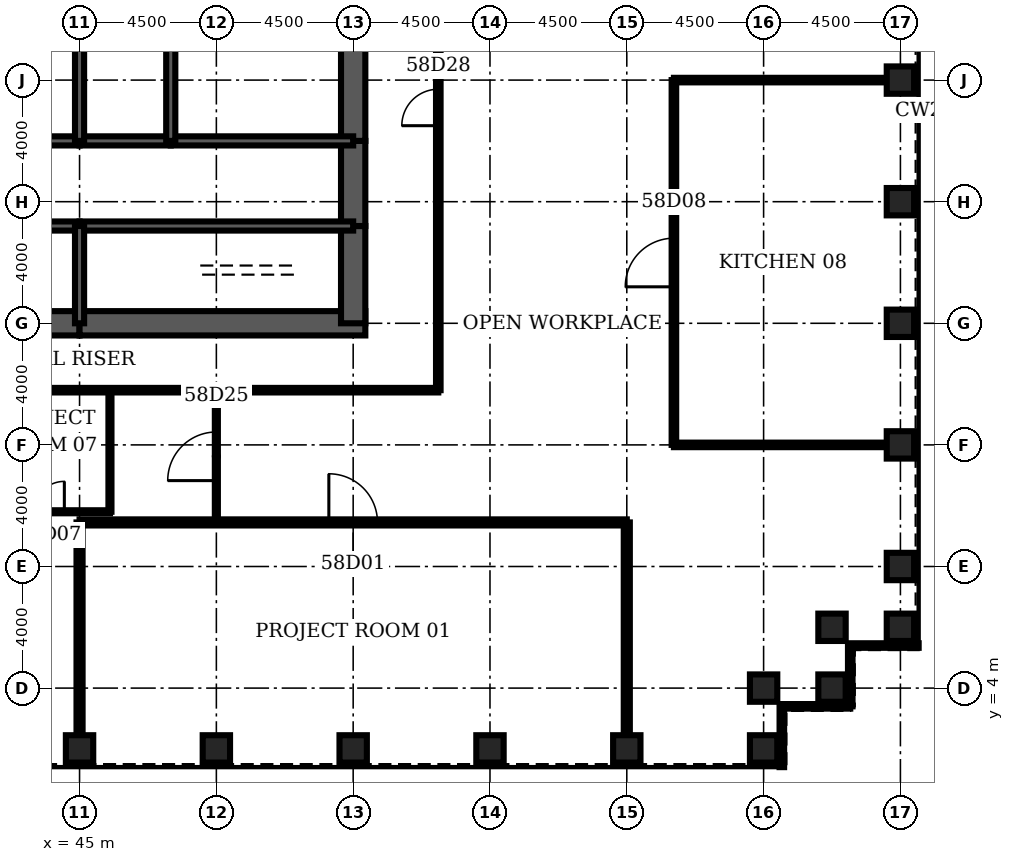
"""IFC4 building model, lengths in metres.
Left out: names, types, materials, properties, quantities, classifications, styles, units other than length and angle.
Written with IfcOpenShell. Run it as: python <this file> out.ifc"""

import sys

from ifc_helpers import new_model, si_unit, direction, frame, frame_2d, origin, origin_2d, place, context, subcontext, project, spatial, rectangle, hollow_rectangle, extrude, element, fill, save


model = new_model("IFC4")
c1 = context("Model", 3, precision=1e-05, world=origin(), true_north=direction((0.0, 1.0)))
c2 = subcontext(c1, "Body", "Model", "MODEL_VIEW")
j1 = project(units=[si_unit("LENGTHUNIT", "METRE"), si_unit("PLANEANGLEUNIT", "RADIAN")], contexts=[c1])
p1 = place(None, origin())
s1 = spatial("IfcSite", under=j1, at=p1, CompositionType="ELEMENT")
p2 = place(p1, origin())
s2 = spatial("IfcBuilding", under=s1, at=p2, CompositionType="ELEMENT")
p3 = place(p2, frame((0.0, 0.0, 257.2)))
s3 = spatial("IfcBuildingStorey", under=s2, at=p3, CompositionType="ELEMENT", Elevation=257.2)
for number, where, z_axis, x_axis in (
    (1, (45.0, 2.0, 0.0), (0.0, 0.0, 1.0), (0.0, 1.0, 0.0)),
    (2, (49.5, 2.0, 0.0), (0.0, 0.0, 1.0), (0.0, 1.0, 0.0)),
    (3, (54.0, 2.0, 0.0), (0.0, 0.0, 1.0), (0.0, 1.0, 0.0)),
    (4, (58.5, 2.0, 0.0), (0.0, 0.0, 1.0), (0.0, 1.0, 0.0)),
    (5, (63.0, 2.0, 0.0), (0.0, 0.0, 1.0), (0.0, 1.0, 0.0)),
    (6, (67.5, 2.0, 0.0), (0.0, 0.0, 1.0), (0.0, 1.0, 0.0)),
    (7, (67.5, 4.0, 0.0), (0.0, 0.0, 1.0), (0.0, 1.0, 0.0)),
    (8, (69.75, 4.0, 0.0), (0.0, 0.0, 1.0), (1.0, 0.0, 0.0)),
    (9, (69.75, 6.0, 0.0), (0.0, 0.0, 1.0), (1.0, 0.0, 0.0)),
    (10, (72.0, 6.0, 0.0), (0.0, 0.0, 1.0), (1.0, 0.0, 0.0)),
    (11, (72.0, 8.0, 0.0), (0.0, 0.0, 1.0), (1.0, 0.0, 0.0)),
    (12, (72.0, 12.0, 0.0), (0.0, 0.0, 1.0), (1.0, 0.0, 0.0)),
    (13, (72.0, 16.0, 0.0), (0.0, 0.0, 1.0), (1.0, 0.0, 0.0)),
    (14, (72.0, 20.0, 0.0), (0.0, 0.0, 1.0), (1.0, 0.0, 0.0)),
    (15, (72.0, 24.0, 0.0), (0.0, 0.0, 1.0), (1.0, 0.0, 0.0)),
):
    element("IfcColumn", number, at=place(p3, frame(where, z_axis=z_axis, x_axis=x_axis)), inside=s3, PredefinedType="COLUMN", context=c2, shape_type="SweptSolid", body=[
        extrude(hollow_rectangle(XDim=0.9, YDim=0.9, WallThickness=0.07, at=origin_2d()), origin(), (0.0, 0.0, 1.0), 4.2),
    ])
p4 = place(p3, frame((42.0, 16.0, 0.0), z_axis=(0.0, 0.0, 1.0), x_axis=(1.0, 0.0, 0.0)))
e16 = element("IfcWall", 16, at=p4, inside=s3, PredefinedType="SHEAR", context=c2, shape_type="SweptSolid", body=[
    extrude(rectangle(XDim=3.0, YDim=0.8, at=frame_2d((1.5, 0.0))), origin(), (0.0, 0.0, 1.0), 4.2),
])
p5 = place(p3, frame((45.0, 16.0, 0.0), z_axis=(0.0, 0.0, 1.0), x_axis=(1.0, 0.0, 0.0)))
e17 = element("IfcWall", 17, at=p5, inside=s3, PredefinedType="SHEAR", context=c2, shape_type="SweptSolid", body=[
    extrude(rectangle(XDim=9.4, YDim=0.8, at=frame_2d((4.7, 0.0))), origin(), (0.0, 0.0, 1.0), 4.2),
])
p6 = place(p3, frame((54.0, 16.0, 0.0), z_axis=(0.0, 0.0, 1.0), x_axis=(0.0, 1.0, 0.0)))
e18 = element("IfcWall", 18, at=p6, inside=s3, PredefinedType="SHEAR", context=c2, shape_type="SweptSolid", body=[
    extrude(rectangle(XDim=3.2, YDim=0.8, at=frame_2d((1.6, 0.0))), origin(), (0.0, 0.0, 1.0), 4.2),
])
p7 = place(p3, frame((54.0, 19.2, 0.0), z_axis=(0.0, 0.0, 1.0), x_axis=(0.0, 1.0, 0.0)))
e19 = element("IfcWall", 19, at=p7, inside=s3, PredefinedType="SHEAR", context=c2, shape_type="SweptSolid", body=[
    extrude(rectangle(XDim=2.8, YDim=0.8, at=frame_2d((1.4, 0.0))), origin(), (0.0, 0.0, 1.0), 4.2),
])
p8 = place(p7, frame((0.4, 0.0, 0.0)))
e20 = element("IfcOpeningElement", 20, at=p8, cuts=e19, PredefinedType="OPENING", context=c2, shape_type="SweptSolid", body=[
    extrude(rectangle(XDim=1.8, YDim=2.1, at=frame_2d((0.9, 1.05))), frame((0.0, 0.41, 0.0), z_axis=(0.0, -1.0, 0.0), x_axis=(1.0, 0.0, 0.0)), (0.0, 0.0, 1.0), 0.82),
])
p9 = place(p3, frame((54.0, 22.0, 0.0), z_axis=(0.0, 0.0, 1.0), x_axis=(0.0, 1.0, 0.0)))
e21 = element("IfcWall", 21, at=p9, inside=s3, PredefinedType="SHEAR", context=c2, shape_type="SweptSolid", body=[
    extrude(rectangle(XDim=4.0, YDim=0.8, at=frame_2d((2.0, 0.0))), origin(), (0.0, 0.0, 1.0), 4.2),
])
p10 = place(p3, frame((42.0, 19.2, 0.0), z_axis=(0.0, 0.0, 1.0), x_axis=(1.0, 0.0, 0.0)))
e22 = element("IfcWall", 22, at=p10, inside=s3, PredefinedType="SOLIDWALL", context=c2, shape_type="SweptSolid", body=[
    extrude(rectangle(XDim=3.0, YDim=0.3, at=frame_2d((1.5, 0.0))), origin(), (0.0, 0.0, 1.0), 4.2),
])
p11 = place(p10, frame((1.0, 0.0, 0.0)))
e23 = element("IfcOpeningElement", 23, at=p11, cuts=e22, PredefinedType="OPENING", context=c2, shape_type="SweptSolid", body=[
    extrude(rectangle(XDim=1.0, YDim=2.1, at=frame_2d((0.5, 1.05))), frame((0.0, 0.16, 0.0), z_axis=(0.0, -1.0, 0.0), x_axis=(1.0, 0.0, 0.0)), (0.0, 0.0, 1.0), 0.32),
])
p12 = place(p3, frame((45.0, 19.2, 0.0), z_axis=(0.0, 0.0, 1.0), x_axis=(1.0, 0.0, 0.0)))
e24 = element("IfcWall", 24, at=p12, inside=s3, PredefinedType="SOLIDWALL", context=c2, shape_type="SweptSolid", body=[
    extrude(rectangle(XDim=9.0, YDim=0.3, at=frame_2d((4.5, 0.0))), origin(), (0.0, 0.0, 1.0), 4.2),
])
p13 = place(p12, frame((7.35, 0.0, 0.0)))
e25 = element("IfcOpeningElement", 25, at=p13, cuts=e24, PredefinedType="OPENING", context=c2, shape_type="SweptSolid", body=[
    extrude(rectangle(XDim=1.0, YDim=2.1, at=frame_2d((0.5, 1.05))), frame((0.0, 0.16, 0.0), z_axis=(0.0, -1.0, 0.0), x_axis=(1.0, 0.0, 0.0)), (0.0, 0.0, 1.0), 0.32),
])
p14 = place(p3, frame((36.0, 22.0, 0.0), z_axis=(0.0, 0.0, 1.0), x_axis=(1.0, 0.0, 0.0)))
e26 = element("IfcWall", 26, at=p14, inside=s3, PredefinedType="SOLIDWALL", context=c2, shape_type="SweptSolid", body=[
    extrude(rectangle(XDim=9.0, YDim=0.3, at=frame_2d((4.5, 0.0))), origin(), (0.0, 0.0, 1.0), 4.2),
])
p15 = place(p14, frame((4.0, 0.0, 0.0)))
e27 = element("IfcOpeningElement", 27, at=p15, cuts=e26, PredefinedType="OPENING", context=c2, shape_type="SweptSolid", body=[
    extrude(rectangle(XDim=1.0, YDim=2.1, at=frame_2d((0.5, 1.05))), frame((0.0, 0.16, 0.0), z_axis=(0.0, -1.0, 0.0), x_axis=(1.0, 0.0, 0.0)), (0.0, 0.0, 1.0), 0.32),
])
p16 = place(p3, frame((45.0, 22.0, 0.0), z_axis=(0.0, 0.0, 1.0), x_axis=(1.0, 0.0, 0.0)))
e28 = element("IfcWall", 28, at=p16, inside=s3, PredefinedType="SOLIDWALL", context=c2, shape_type="SweptSolid", body=[
    extrude(rectangle(XDim=3.0, YDim=0.3, at=frame_2d((1.5, 0.0))), origin(), (0.0, 0.0, 1.0), 4.2),
])
p17 = place(p16, frame((1.0, 0.0, 0.0)))
e29 = element("IfcOpeningElement", 29, at=p17, cuts=e28, PredefinedType="OPENING", context=c2, shape_type="SweptSolid", body=[
    extrude(rectangle(XDim=1.0, YDim=2.1, at=frame_2d((0.5, 1.05))), frame((0.0, 0.16, 0.0), z_axis=(0.0, -1.0, 0.0), x_axis=(1.0, 0.0, 0.0)), (0.0, 0.0, 1.0), 0.32),
])
p18 = place(p3, frame((48.0, 22.0, 0.0), z_axis=(0.0, 0.0, 1.0), x_axis=(1.0, 0.0, 0.0)))
e30 = element("IfcWall", 30, at=p18, inside=s3, PredefinedType="SOLIDWALL", context=c2, shape_type="SweptSolid", body=[
    extrude(rectangle(XDim=6.0, YDim=0.3, at=frame_2d((3.0, 0.0))), origin(), (0.0, 0.0, 1.0), 4.2),
])
p19 = place(p18, frame((2.0, 0.0, 0.0)))
e31 = element("IfcOpeningElement", 31, at=p19, cuts=e30, PredefinedType="OPENING", context=c2, shape_type="SweptSolid", body=[
    extrude(rectangle(XDim=1.0, YDim=2.1, at=frame_2d((0.5, 1.05))), frame((0.0, 0.16, 0.0), z_axis=(0.0, -1.0, 0.0), x_axis=(1.0, 0.0, 0.0)), (0.0, 0.0, 1.0), 0.32),
])
p20 = place(p18, frame((4.05, 0.0, 0.0)))
e32 = element("IfcOpeningElement", 32, at=p20, cuts=e30, PredefinedType="OPENING", context=c2, shape_type="SweptSolid", body=[
    extrude(rectangle(XDim=1.0, YDim=2.1, at=frame_2d((0.5, 1.05))), frame((0.0, 0.16, 0.0), z_axis=(0.0, -1.0, 0.0), x_axis=(1.0, 0.0, 0.0)), (0.0, 0.0, 1.0), 0.32),
])
p21 = place(p3, frame((45.0, 16.0, 0.0), z_axis=(0.0, 0.0, 1.0), x_axis=(0.0, 1.0, 0.0)))
e33 = element("IfcWall", 33, at=p21, inside=s3, PredefinedType="SOLIDWALL", context=c2, shape_type="SweptSolid", body=[
    extrude(rectangle(XDim=3.2, YDim=0.3, at=frame_2d((1.6, 0.0))), origin(), (0.0, 0.0, 1.0), 4.2),
])
for number, where, z_axis, x_axis in (
    (34, (45.0, 22.0, 0.0), (0.0, 0.0, 1.0), (0.0, 1.0, 0.0)),
    (35, (48.0, 22.0, 0.0), (0.0, 0.0, 1.0), (0.0, 1.0, 0.0)),
):
    element("IfcWall", number, at=place(p3, frame(where, z_axis=z_axis, x_axis=x_axis)), inside=s3, PredefinedType="SOLIDWALL", context=c2, shape_type="SweptSolid", body=[
        extrude(rectangle(XDim=4.0, YDim=0.3, at=frame_2d((2.0, 0.0))), origin(), (0.0, 0.0, 1.0), 4.2),
    ])
p22 = place(p3, frame((42.15, 17.35, 0.0), z_axis=(0.0, 0.0, 1.0), x_axis=(1.0, 0.0, 0.0)))
e36 = element("IfcWall", 36, at=p22, inside=s3, PredefinedType="SOLIDWALL", context=c2, shape_type="SweptSolid", body=[
    extrude(rectangle(XDim=2.7, YDim=0.3, at=frame_2d((1.35, 0.0))), origin(), (0.0, 0.0, 1.0), 4.04),
])
p23 = place(p22, frame((0.85, 0.0, 0.0)))
e37 = element("IfcOpeningElement", 37, at=p23, cuts=e36, PredefinedType="OPENING", context=c2, shape_type="SweptSolid", body=[
    extrude(rectangle(XDim=1.0, YDim=2.1, at=frame_2d((0.5, 1.05))), frame((0.0, 0.16, 0.0), z_axis=(0.0, -1.0, 0.0), x_axis=(1.0, 0.0, 0.0)), (0.0, 0.0, 1.0), 0.32),
])
p24 = place(p3, frame((51.425, 22.15, 0.0), z_axis=(0.0, 0.0, 1.0), x_axis=(0.0, 1.0, 0.0)))
e38 = element("IfcWall", 38, at=p24, inside=s3, PredefinedType="PARTITIONING", context=c2, shape_type="SweptSolid", body=[
    extrude(rectangle(XDim=3.7, YDim=0.15, at=frame_2d((1.85, 0.0))), origin(), (0.0, 0.0, 1.0), 3.0),
])
p25 = place(p3, frame((45.0, 9.45, 0.0), z_axis=(0.0, 0.0, 1.0), x_axis=(1.0, 0.0, 0.0)))
e39 = element("IfcWall", 39, at=p25, inside=s3, PredefinedType="PARTITIONING", context=c2, shape_type="SweptSolid", body=[
    extrude(rectangle(XDim=18.0, YDim=0.2, at=frame_2d((9.0, 0.0))), origin(), (0.0, 0.0, 1.0), 3.0),
])
p26 = place(p25, frame((8.2, 0.0, 0.0)))
e40 = element("IfcOpeningElement", 40, at=p26, cuts=e39, PredefinedType="OPENING", context=c2, shape_type="SweptSolid", body=[
    extrude(rectangle(XDim=1.6, YDim=2.1, at=frame_2d((0.8, 1.05))), frame((0.0, 0.11, 0.0), z_axis=(0.0, -1.0, 0.0), x_axis=(1.0, 0.0, 0.0)), (0.0, 0.0, 1.0), 0.22),
])
p27 = place(p3, frame((22.0, 9.8, 0.0), z_axis=(0.0, 0.0, 1.0), x_axis=(1.0, 0.0, 0.0)))
e41 = element("IfcWall", 41, at=p27, inside=s3, PredefinedType="PARTITIONING", context=c2, shape_type="SweptSolid", body=[
    extrude(rectangle(XDim=24.0, YDim=0.1, at=frame_2d((12.0, 0.0))), origin(), (0.0, 0.0, 1.0), 3.0),
])
p28 = place(p27, frame((1.5, 0.0, 0.0)))
e42 = element("IfcOpeningElement", 42, at=p28, cuts=e41, PredefinedType="OPENING", context=c2, shape_type="SweptSolid", body=[
    extrude(rectangle(XDim=1.0, YDim=2.1, at=frame_2d((0.5, 1.05))), frame((0.0, 0.06, 0.0), z_axis=(0.0, -1.0, 0.0), x_axis=(1.0, 0.0, 0.0)), (0.0, 0.0, 1.0), 0.12),
])
p29 = place(p27, frame((5.5, 0.0, 0.0)))
e43 = element("IfcOpeningElement", 43, at=p29, cuts=e41, PredefinedType="OPENING", context=c2, shape_type="SweptSolid", body=[
    extrude(rectangle(XDim=1.0, YDim=2.1, at=frame_2d((0.5, 1.05))), frame((0.0, 0.06, 0.0), z_axis=(0.0, -1.0, 0.0), x_axis=(1.0, 0.0, 0.0)), (0.0, 0.0, 1.0), 0.12),
])
p30 = place(p27, frame((9.5, 0.0, 0.0)))
e44 = element("IfcOpeningElement", 44, at=p30, cuts=e41, PredefinedType="OPENING", context=c2, shape_type="SweptSolid", body=[
    extrude(rectangle(XDim=1.0, YDim=2.1, at=frame_2d((0.5, 1.05))), frame((0.0, 0.06, 0.0), z_axis=(0.0, -1.0, 0.0), x_axis=(1.0, 0.0, 0.0)), (0.0, 0.0, 1.0), 0.12),
])
p31 = place(p27, frame((13.5, 0.0, 0.0)))
e45 = element("IfcOpeningElement", 45, at=p31, cuts=e41, PredefinedType="OPENING", context=c2, shape_type="SweptSolid", body=[
    extrude(rectangle(XDim=1.0, YDim=2.1, at=frame_2d((0.5, 1.05))), frame((0.0, 0.06, 0.0), z_axis=(0.0, -1.0, 0.0), x_axis=(1.0, 0.0, 0.0)), (0.0, 0.0, 1.0), 0.12),
])
p32 = place(p27, frame((17.5, 0.0, 0.0)))
e46 = element("IfcOpeningElement", 46, at=p32, cuts=e41, PredefinedType="OPENING", context=c2, shape_type="SweptSolid", body=[
    extrude(rectangle(XDim=1.0, YDim=2.1, at=frame_2d((0.5, 1.05))), frame((0.0, 0.06, 0.0), z_axis=(0.0, -1.0, 0.0), x_axis=(1.0, 0.0, 0.0)), (0.0, 0.0, 1.0), 0.12),
])
p33 = place(p27, frame((21.5, 0.0, 0.0)))
e47 = element("IfcOpeningElement", 47, at=p33, cuts=e41, PredefinedType="OPENING", context=c2, shape_type="SweptSolid", body=[
    extrude(rectangle(XDim=1.0, YDim=2.1, at=frame_2d((0.5, 1.05))), frame((0.0, 0.06, 0.0), z_axis=(0.0, -1.0, 0.0), x_axis=(1.0, 0.0, 0.0)), (0.0, 0.0, 1.0), 0.12),
])
p34 = place(p3, frame((64.55, 12.0, 0.0), z_axis=(0.0, 0.0, 1.0), x_axis=(1.0, 0.0, 0.0)))
e48 = element("IfcWall", 48, at=p34, inside=s3, PredefinedType="PARTITIONING", context=c2, shape_type="SweptSolid", body=[
    extrude(rectangle(XDim=7.0, YDim=0.15, at=frame_2d((3.5, 0.0))), origin(), (0.0, 0.0, 1.0), 3.0),
])
p35 = place(p3, frame((15.2, 13.8, 0.0), z_axis=(0.0, 0.0, 1.0), x_axis=(1.0, 0.0, 0.0)))
e49 = element("IfcWall", 49, at=p35, inside=s3, PredefinedType="PARTITIONING", context=c2, shape_type="SweptSolid", body=[
    extrude(rectangle(XDim=41.6, YDim=0.15, at=frame_2d((20.8, 0.0))), origin(), (0.0, 0.0, 1.0), 3.0),
])
p36 = place(p35, frame((4.175, 0.0, 0.0)))
e50 = element("IfcOpeningElement", 50, at=p36, cuts=e49, PredefinedType="OPENING", context=c2, shape_type="SweptSolid", body=[
    extrude(rectangle(XDim=1.2, YDim=2.1, at=frame_2d((0.6, 1.05))), frame((0.0, 0.085, 0.0), z_axis=(0.0, -1.0, 0.0), x_axis=(1.0, 0.0, 0.0)), (0.0, 0.0, 1.0), 0.17),
])
p37 = place(p3, frame((64.55, 24.0, 0.0), z_axis=(0.0, 0.0, 1.0), x_axis=(1.0, 0.0, 0.0)))
e51 = element("IfcWall", 51, at=p37, inside=s3, PredefinedType="PARTITIONING", context=c2, shape_type="SweptSolid", body=[
    extrude(rectangle(XDim=7.0, YDim=0.15, at=frame_2d((3.5, 0.0))), origin(), (0.0, 0.0, 1.0), 3.0),
])
p38 = place(p3, frame((45.0, 2.45, 0.0), z_axis=(0.0, 0.0, 1.0), x_axis=(0.0, 1.0, 0.0)))
e52 = element("IfcWall", 52, at=p38, inside=s3, PredefinedType="PARTITIONING", context=c2, shape_type="SweptSolid", body=[
    extrude(rectangle(XDim=7.0, YDim=0.2, at=frame_2d((3.5, 0.0))), origin(), (0.0, 0.0, 1.0), 3.0),
])
p39 = place(p3, frame((46.0, 9.8, 0.0), z_axis=(0.0, 0.0, 1.0), x_axis=(0.0, 1.0, 0.0)))
e53 = element("IfcWall", 53, at=p39, inside=s3, PredefinedType="PARTITIONING", context=c2, shape_type="SweptSolid", body=[
    extrude(rectangle(XDim=4.0, YDim=0.1, at=frame_2d((2.0, 0.0))), origin(), (0.0, 0.0, 1.0), 3.0),
])
p40 = place(p3, frame((49.5, 9.45, 0.0), z_axis=(0.0, 0.0, 1.0), x_axis=(0.0, 1.0, 0.0)))
e54 = element("IfcWall", 54, at=p40, inside=s3, PredefinedType="PARTITIONING", context=c2, shape_type="SweptSolid", body=[
    extrude(rectangle(XDim=4.35, YDim=0.1, at=frame_2d((2.175, 0.0))), origin(), (0.0, 0.0, 1.0), 3.0),
])
p41 = place(p40, frame((1.375, 0.0, 0.0)))
e55 = element("IfcOpeningElement", 55, at=p41, cuts=e54, PredefinedType="OPENING", context=c2, shape_type="SweptSolid", body=[
    extrude(rectangle(XDim=1.6, YDim=2.1, at=frame_2d((0.8, 1.05))), frame((0.0, 0.06, 0.0), z_axis=(0.0, -1.0, 0.0), x_axis=(1.0, 0.0, 0.0)), (0.0, 0.0, 1.0), 0.12),
])
p42 = place(p3, frame((56.8, 13.8, 0.0), z_axis=(0.0, 0.0, 1.0), x_axis=(0.0, 1.0, 0.0)))
e56 = element("IfcWall", 56, at=p42, inside=s3, PredefinedType="PARTITIONING", context=c2, shape_type="SweptSolid", body=[
    extrude(rectangle(XDim=18.6, YDim=0.15, at=frame_2d((9.3, 0.0))), origin(), (0.0, 0.0, 1.0), 3.0),
])
p43 = place(p42, frame((8.7, 0.0, 0.0)))
e57 = element("IfcOpeningElement", 57, at=p43, cuts=e56, PredefinedType="OPENING", context=c2, shape_type="SweptSolid", body=[
    extrude(rectangle(XDim=1.2, YDim=2.1, at=frame_2d((0.6, 1.05))), frame((0.0, 0.085, 0.0), z_axis=(0.0, -1.0, 0.0), x_axis=(1.0, 0.0, 0.0)), (0.0, 0.0, 1.0), 0.17),
])
p44 = place(p3, frame((63.0, 2.45, 0.0), z_axis=(0.0, 0.0, 1.0), x_axis=(0.0, 1.0, 0.0)))
e58 = element("IfcWall", 58, at=p44, inside=s3, PredefinedType="PARTITIONING", context=c2, shape_type="SweptSolid", body=[
    extrude(rectangle(XDim=7.0, YDim=0.2, at=frame_2d((3.5, 0.0))), origin(), (0.0, 0.0, 1.0), 3.0),
])
p45 = place(p3, frame((64.55, 12.0, 0.0), z_axis=(0.0, 0.0, 1.0), x_axis=(0.0, 1.0, 0.0)))
e59 = element("IfcWall", 59, at=p45, inside=s3, PredefinedType="PARTITIONING", context=c2, shape_type="SweptSolid", body=[
    extrude(rectangle(XDim=12.0, YDim=0.15, at=frame_2d((6.0, 0.0))), origin(), (0.0, 0.0, 1.0), 3.0),
])
p46 = place(p45, frame((5.2, 0.0, 0.0)))
e60 = element("IfcOpeningElement", 60, at=p46, cuts=e59, PredefinedType="OPENING", context=c2, shape_type="SweptSolid", body=[
    extrude(rectangle(XDim=1.6, YDim=2.1, at=frame_2d((0.8, 1.05))), frame((0.0, 0.085, 0.0), z_axis=(0.0, -1.0, 0.0), x_axis=(1.0, 0.0, 0.0)), (0.0, 0.0, 1.0), 0.17),
])
p47 = place(p3, frame((68.1, 1.4, 0.0), z_axis=(0.0, 0.0, 1.0), x_axis=(0.0, 1.0, 0.0)))
e61 = element("IfcWall", 61, at=p47, inside=s3, PredefinedType="ELEMENTEDWALL", context=c2, shape_type="SweptSolid", body=[
    extrude(rectangle(XDim=2.0, YDim=0.15, at=frame_2d((1.0, 0.0))), origin(), (0.0, 0.0, 1.0), 4.04),
])
p48 = place(p3, frame((68.1, 3.4, 0.0), z_axis=(0.0, 0.0, 1.0), x_axis=(1.0, 0.0, 0.0)))
e62 = element("IfcWall", 62, at=p48, inside=s3, PredefinedType="ELEMENTEDWALL", context=c2, shape_type="SweptSolid", body=[
    extrude(rectangle(XDim=2.25, YDim=0.15, at=frame_2d((1.125, 0.0))), origin(), (0.0, 0.0, 1.0), 4.04),
])
p49 = place(p3, frame((70.35, 3.4, 0.0), z_axis=(0.0, 0.0, 1.0), x_axis=(0.0, 1.0, 0.0)))
e63 = element("IfcWall", 63, at=p49, inside=s3, PredefinedType="ELEMENTEDWALL", context=c2, shape_type="SweptSolid", body=[
    extrude(rectangle(XDim=2.0, YDim=0.15, at=frame_2d((1.0, 0.0))), origin(), (0.0, 0.0, 1.0), 4.04),
])
p50 = place(p3, frame((70.35, 5.4, 0.0), z_axis=(0.0, 0.0, 1.0), x_axis=(1.0, 0.0, 0.0)))
e64 = element("IfcWall", 64, at=p50, inside=s3, PredefinedType="ELEMENTEDWALL", context=c2, shape_type="SweptSolid", body=[
    extrude(rectangle(XDim=2.25, YDim=0.15, at=frame_2d((1.125, 0.0))), origin(), (0.0, 0.0, 1.0), 4.04),
])
p51 = place(p26, origin())
e65 = element("IfcDoor", 65, at=p51, inside=s3, OperationType="SINGLE_SWING_LEFT", PredefinedType="DOOR", context=c2, shape_type="SweptSolid", body=[
    extrude(rectangle(XDim=1.6, YDim=2.1, at=frame_2d((0.8, 1.05))), frame((0.0, 0.025, 0.0), z_axis=(0.0, -1.0, 0.0), x_axis=(1.0, 0.0, 0.0)), (0.0, 0.0, 1.0), 0.05),
])
fill(e40, e65)
p52 = place(p33, origin())
e66 = element("IfcDoor", 66, at=p52, inside=s3, OperationType="SINGLE_SWING_RIGHT", PredefinedType="DOOR", context=c2, shape_type="SweptSolid", body=[
    extrude(rectangle(XDim=1.0, YDim=2.1, at=frame_2d((0.5, 1.05))), frame((0.0, 0.025, 0.0), z_axis=(0.0, -1.0, 0.0), x_axis=(1.0, 0.0, 0.0)), (0.0, 0.0, 1.0), 0.05),
])
fill(e47, e66)
p53 = place(p46, origin())
e67 = element("IfcDoor", 67, at=p53, inside=s3, OperationType="SINGLE_SWING_LEFT", PredefinedType="DOOR", context=c2, shape_type="SweptSolid", body=[
    extrude(rectangle(XDim=1.6, YDim=2.1, at=frame_2d((0.8, 1.05))), frame((0.0, 0.025, 0.0), z_axis=(0.0, -1.0, 0.0), x_axis=(1.0, 0.0, 0.0)), (0.0, 0.0, 1.0), 0.05),
])
fill(e60, e67)
p54 = place(p41, origin())
e68 = element("IfcDoor", 68, at=p54, inside=s3, OperationType="SINGLE_SWING_LEFT", PredefinedType="DOOR", context=c2, shape_type="SweptSolid", body=[
    extrude(rectangle(XDim=1.6, YDim=2.1, at=frame_2d((0.8, 1.05))), frame((0.0, 0.025, 0.0), z_axis=(0.0, -1.0, 0.0), x_axis=(1.0, 0.0, 0.0)), (0.0, 0.0, 1.0), 0.05),
])
fill(e55, e68)
p55 = place(p43, origin())
e69 = element("IfcDoor", 69, at=p55, inside=s3, OperationType="SINGLE_SWING_LEFT", PredefinedType="DOOR", context=c2, shape_type="SweptSolid", body=[
    extrude(rectangle(XDim=1.2, YDim=2.1, at=frame_2d((0.6, 1.05))), frame((0.0, 0.025, 0.0), z_axis=(0.0, -1.0, 0.0), x_axis=(1.0, 0.0, 0.0)), (0.0, 0.0, 1.0), 0.05),
])
fill(e57, e69)
p56 = place(p13, origin())
e70 = element("IfcDoor", 70, at=p56, inside=s3, OperationType="SINGLE_SWING_RIGHT", PredefinedType="DOOR", context=c2, shape_type="SweptSolid", body=[
    extrude(rectangle(XDim=1.0, YDim=2.1, at=frame_2d((0.5, 1.05))), frame((0.0, 0.025, 0.0), z_axis=(0.0, -1.0, 0.0), x_axis=(1.0, 0.0, 0.0)), (0.0, 0.0, 1.0), 0.05),
])
fill(e25, e70)
p57 = place(p8, origin())
e71 = element("IfcDoor", 71, at=p57, inside=s3, OperationType="SINGLE_SWING_LEFT", PredefinedType="DOOR", context=c2, shape_type="SweptSolid", body=[
    extrude(rectangle(XDim=1.8, YDim=2.1, at=frame_2d((0.9, 1.05))), frame((0.0, 0.4, 0.0), z_axis=(0.0, -1.0, 0.0), x_axis=(1.0, 0.0, 0.0)), (0.0, 0.0, 1.0), 0.8),
])
fill(e20, e71)
p58 = place(p17, origin())
e72 = element("IfcDoor", 72, at=p58, inside=s3, OperationType="SINGLE_SWING_LEFT", PredefinedType="DOOR", context=c2, shape_type="SweptSolid", body=[
    extrude(rectangle(XDim=1.0, YDim=2.1, at=frame_2d((0.5, 1.05))), frame((0.0, 0.025, 0.0), z_axis=(0.0, -1.0, 0.0), x_axis=(1.0, 0.0, 0.0)), (0.0, 0.0, 1.0), 0.05),
])
fill(e29, e72)
p59 = place(p19, origin())
e73 = element("IfcDoor", 73, at=p59, inside=s3, OperationType="SINGLE_SWING_LEFT", PredefinedType="DOOR", context=c2, shape_type="SweptSolid", body=[
    extrude(rectangle(XDim=1.0, YDim=2.1, at=frame_2d((0.5, 1.05))), frame((0.0, 0.025, 0.0), z_axis=(0.0, -1.0, 0.0), x_axis=(1.0, 0.0, 0.0)), (0.0, 0.0, 1.0), 0.05),
])
fill(e31, e73)
p60 = place(p20, origin())
e74 = element("IfcDoor", 74, at=p60, inside=s3, OperationType="SINGLE_SWING_RIGHT", PredefinedType="DOOR", context=c2, shape_type="SweptSolid", body=[
    extrude(rectangle(XDim=1.0, YDim=2.1, at=frame_2d((0.5, 1.05))), frame((0.0, 0.025, 0.0), z_axis=(0.0, -1.0, 0.0), x_axis=(1.0, 0.0, 0.0)), (0.0, 0.0, 1.0), 0.05),
])
fill(e32, e74)
save(model, sys.argv[1])
